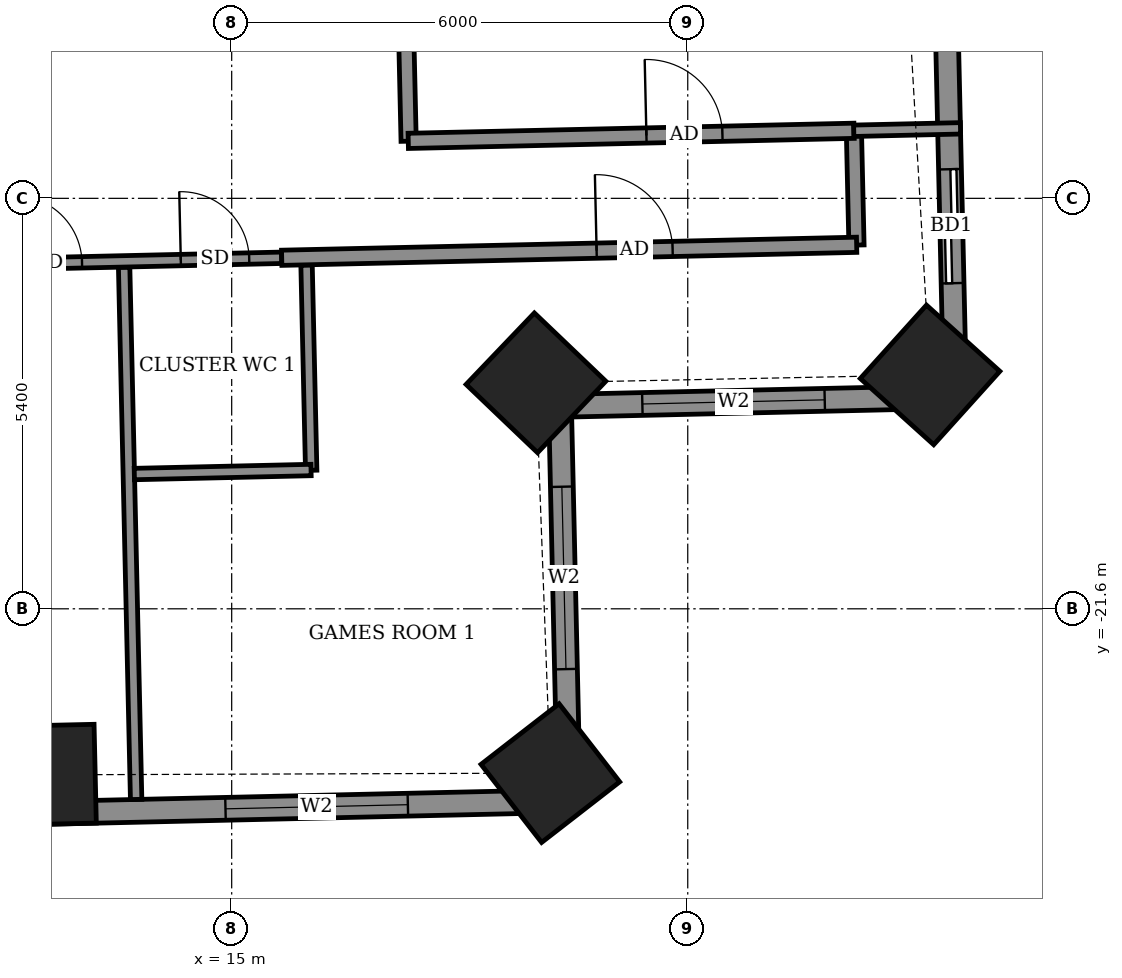
"""IFC4 building model, lengths in metres.
Left out: names, types, materials, properties, quantities, classifications, styles, units other than length and angle.
Written with IfcOpenShell. Run it as: python <this file> out.ifc"""

import sys

from ifc_helpers import new_model, si_unit, direction, frame, frame_2d, origin, origin_2d, place, context, subcontext, project, spatial, rectangle, extrude, element, fill, save


model = new_model("IFC4")
c1 = context("Model", 3, precision=1e-05, world=origin(), true_north=direction((0.0, 1.0)))
c2 = subcontext(c1, "Body", "Model", "MODEL_VIEW")
j1 = project(units=[si_unit("LENGTHUNIT", "METRE"), si_unit("PLANEANGLEUNIT", "RADIAN")], contexts=[c1])
p1 = place(None, origin())
s1 = spatial("IfcSite", under=j1, at=p1, CompositionType="ELEMENT")
p2 = place(p1, origin())
s2 = spatial("IfcBuilding", under=s1, at=p2, CompositionType="ELEMENT")
p3 = place(p2, frame((0.0, 0.0, 144.5)))
s3 = spatial("IfcBuildingStorey", under=s2, at=p3, CompositionType="ELEMENT", Elevation=144.5)
for number, where, z_axis, x_axis in (
    (1, (12.554, -23.784, -0.55), (0.0, 0.0, 1.0), (1.0, 0.023, 0.0)),
    (2, (19.192, -23.761, -0.55), (0.0, 0.0, 1.0), (0.79, 0.613, 0.0)),
    (3, (19.003, -18.627, -0.55), (0.0, 0.0, 1.0), (0.691, 0.723, 0.0)),
    (4, (24.188, -18.523, -0.55), (0.0, 0.0, 1.0), (0.67, 0.743, 0.0)),
):
    element("IfcColumn", number, at=place(p3, frame(where, z_axis=z_axis, x_axis=x_axis)), inside=s3, PredefinedType="COLUMN", context=c2, shape_type="SweptSolid", body=[
        extrude(rectangle(XDim=1.3, YDim=1.3, at=origin_2d()), origin(), (0.0, 0.0, 1.0), 3.6),
    ])
p4 = place(p3, frame((24.518, -18.812, 0.0), z_axis=(0.0, 0.0, 1.0), x_axis=(-0.02269451316, 0.999742446369, 0.0)))
e5 = element("IfcWall", 5, at=p4, inside=s3, PredefinedType="SOLIDWALL", context=c2, shape_type="SweptSolid", body=[
    extrude(rectangle(XDim=10.93, YDim=0.3, at=frame_2d((5.465, 0.0))), origin(), (0.0, 0.0, 1.0), 3.05),
])
p5 = place(p4, frame((1.496, 0.0, 0.0)))
e6 = element("IfcOpeningElement", 6, at=p5, cuts=e5, PredefinedType="OPENING", context=c2, shape_type="SweptSolid", body=[
    extrude(rectangle(XDim=1.5, YDim=2.4, at=frame_2d((0.75, 1.2))), frame((0.0, 0.16, 0.0), z_axis=(0.0, -1.0, 0.0), x_axis=(1.0, 0.0, 0.0)), (0.0, 0.0, 1.0), 0.32),
])
p6 = place(p4, frame((6.119, 0.0, 0.9)))
e7 = element("IfcOpeningElement", 7, at=p6, cuts=e5, PredefinedType="OPENING", context=c2, shape_type="SweptSolid", body=[
    extrude(rectangle(XDim=0.9, YDim=1.5, at=frame_2d((0.45, 0.75))), frame((0.0, 0.16, 0.0), z_axis=(0.0, -1.0, 0.0), x_axis=(1.0, 0.0, 0.0)), (0.0, 0.0, 1.0), 0.32),
])
p7 = place(p4, frame((7.675, 0.0, 0.9)))
e8 = element("IfcOpeningElement", 8, at=p7, cuts=e5, PredefinedType="OPENING", context=c2, shape_type="SweptSolid", body=[
    extrude(rectangle(XDim=2.4, YDim=1.5, at=frame_2d((1.2, 0.75))), frame((0.0, 0.16, 0.0), z_axis=(0.0, -1.0, 0.0), x_axis=(1.0, 0.0, 0.0)), (0.0, 0.0, 1.0), 0.32),
])
p8 = place(p3, frame((-22.396, -25.078, 0.0), z_axis=(0.0, 0.0, 1.0), x_axis=(0.99974279854, 0.022678993965, 0.0)))
e9 = element("IfcWall", 9, at=p8, inside=s3, PredefinedType="SOLIDWALL", context=c2, shape_type="SweptSolid", body=[
    extrude(rectangle(XDim=41.844, YDim=0.3, at=frame_2d((20.922, 0.0))), origin(), (0.0, 0.0, 1.0), 3.05),
])
p9 = place(p8, frame((2.196, 0.0, 0.0)))
e10 = element("IfcOpeningElement", 10, at=p9, cuts=e9, PredefinedType="OPENING", context=c2, shape_type="SweptSolid", body=[
    extrude(rectangle(XDim=1.5, YDim=2.4, at=frame_2d((0.75, 1.2))), frame((0.0, 0.16, 0.0), z_axis=(0.0, -1.0, 0.0), x_axis=(1.0, 0.0, 0.0)), (0.0, 0.0, 1.0), 0.32),
])
p10 = place(p8, frame((7.737, 0.0, 0.0)))
e11 = element("IfcOpeningElement", 11, at=p10, cuts=e9, PredefinedType="OPENING", context=c2, shape_type="SweptSolid", body=[
    extrude(rectangle(XDim=1.2, YDim=2.4, at=frame_2d((0.6, 1.2))), frame((0.0, 0.16, 0.0), z_axis=(0.0, -1.0, 0.0), x_axis=(1.0, 0.0, 0.0)), (0.0, 0.0, 1.0), 0.32),
])
p11 = place(p8, frame((10.699, 0.0, 0.0)))
e12 = element("IfcOpeningElement", 12, at=p11, cuts=e9, PredefinedType="OPENING", context=c2, shape_type="SweptSolid", body=[
    extrude(rectangle(XDim=1.5, YDim=2.4, at=frame_2d((0.75, 1.2))), frame((0.0, 0.16, 0.0), z_axis=(0.0, -1.0, 0.0), x_axis=(1.0, 0.0, 0.0)), (0.0, 0.0, 1.0), 0.32),
])
p12 = place(p8, frame((15.549, 0.0, 0.0)))
e13 = element("IfcOpeningElement", 13, at=p12, cuts=e9, PredefinedType="OPENING", context=c2, shape_type="SweptSolid", body=[
    extrude(rectangle(XDim=1.5, YDim=2.4, at=frame_2d((0.75, 1.2))), frame((0.0, 0.16, 0.0), z_axis=(0.0, -1.0, 0.0), x_axis=(1.0, 0.0, 0.0)), (0.0, 0.0, 1.0), 0.32),
])
p13 = place(p8, frame((18.661, 0.0, 0.0)))
e14 = element("IfcOpeningElement", 14, at=p13, cuts=e9, PredefinedType="OPENING", context=c2, shape_type="SweptSolid", body=[
    extrude(rectangle(XDim=1.5, YDim=2.4, at=frame_2d((0.75, 1.2))), frame((0.0, 0.16, 0.0), z_axis=(0.0, -1.0, 0.0), x_axis=(1.0, 0.0, 0.0)), (0.0, 0.0, 1.0), 0.32),
])
p14 = place(p8, frame((24.125, 0.0, 0.0)))
e15 = element("IfcOpeningElement", 15, at=p14, cuts=e9, PredefinedType="OPENING", context=c2, shape_type="SweptSolid", body=[
    extrude(rectangle(XDim=1.5, YDim=2.4, at=frame_2d((0.75, 1.2))), frame((0.0, 0.16, 0.0), z_axis=(0.0, -1.0, 0.0), x_axis=(1.0, 0.0, 0.0)), (0.0, 0.0, 1.0), 0.32),
])
p15 = place(p8, frame((29.298, 0.0, 0.0)))
e16 = element("IfcOpeningElement", 16, at=p15, cuts=e9, PredefinedType="OPENING", context=c2, shape_type="SweptSolid", body=[
    extrude(rectangle(XDim=1.5, YDim=2.4, at=frame_2d((0.75, 1.2))), frame((0.0, 0.16, 0.0), z_axis=(0.0, -1.0, 0.0), x_axis=(1.0, 0.0, 0.0)), (0.0, 0.0, 1.0), 0.32),
])
p16 = place(p8, frame((32.41, 0.0, 0.0)))
e17 = element("IfcOpeningElement", 17, at=p16, cuts=e9, PredefinedType="OPENING", context=c2, shape_type="SweptSolid", body=[
    extrude(rectangle(XDim=1.5, YDim=2.4, at=frame_2d((0.75, 1.2))), frame((0.0, 0.16, 0.0), z_axis=(0.0, -1.0, 0.0), x_axis=(1.0, 0.0, 0.0)), (0.0, 0.0, 1.0), 0.32),
])
p17 = place(p8, frame((37.324, 0.0, 0.9)))
e18 = element("IfcOpeningElement", 18, at=p17, cuts=e9, PredefinedType="OPENING", context=c2, shape_type="SweptSolid", body=[
    extrude(rectangle(XDim=2.4, YDim=1.5, at=frame_2d((1.2, 0.75))), frame((0.0, 0.16, 0.0), z_axis=(0.0, -1.0, 0.0), x_axis=(1.0, 0.0, 0.0)), (0.0, 0.0, 1.0), 0.32),
])
p18 = place(p3, frame((19.437, -24.129, 0.0), z_axis=(0.0, 0.0, 1.0), x_axis=(-0.022565008749, 0.999745377774, 0.0)))
e19 = element("IfcWall", 19, at=p18, inside=s3, PredefinedType="SOLIDWALL", context=c2, shape_type="SweptSolid", body=[
    extrude(rectangle(XDim=5.496, YDim=0.3, at=frame_2d((2.748, 0.0))), origin(), (0.0, 0.0, 1.0), 2.55),
])
p19 = place(p18, frame((1.736, 0.0, 0.9)))
e20 = element("IfcOpeningElement", 20, at=p19, cuts=e19, PredefinedType="OPENING", context=c2, shape_type="SweptSolid", body=[
    extrude(rectangle(XDim=2.4, YDim=1.5, at=frame_2d((1.2, 0.75))), frame((0.0, 0.16, 0.0), z_axis=(0.0, -1.0, 0.0), x_axis=(1.0, 0.0, 0.0)), (0.0, 0.0, 1.0), 0.32),
])
p20 = place(p3, frame((19.319, -18.93, 0.0), z_axis=(0.0, 0.0, 1.0), x_axis=(0.999742379723, 0.022697448881, 0.0)))
e21 = element("IfcWall", 21, at=p20, inside=s3, PredefinedType="SOLIDWALL", context=c2, shape_type="SweptSolid", body=[
    extrude(rectangle(XDim=5.324, YDim=0.3, at=frame_2d((2.662, 0.0))), origin(), (0.0, 0.0, 1.0), 2.55),
])
p21 = place(p20, frame((1.084, 0.0, 0.9)))
e22 = element("IfcOpeningElement", 22, at=p21, cuts=e21, PredefinedType="OPENING", context=c2, shape_type="SweptSolid", body=[
    extrude(rectangle(XDim=2.4, YDim=1.5, at=frame_2d((1.2, 0.75))), frame((0.0, 0.16, 0.0), z_axis=(0.0, -1.0, 0.0), x_axis=(1.0, 0.0, 0.0)), (0.0, 0.0, 1.0), 0.32),
])
p22 = place(p3, frame((13.743, -24.108, 0.0), z_axis=(0.0, 0.0, 1.0), x_axis=(-0.02255982614, 0.999745494736, 0.0)))
e23 = element("IfcWall", 23, at=p22, inside=s3, PredefinedType="PARTITIONING", context=c2, shape_type="SweptSolid", body=[
    extrude(rectangle(XDim=7.002, YDim=0.15, at=frame_2d((3.501, 0.0))), origin(), (0.0, 0.0, 1.0), 2.55),
])
p23 = place(p3, frame((16.046, -19.778, 0.0), z_axis=(0.0, 0.0, 1.0), x_axis=(-0.022518033722, 0.999746436932, 0.0)))
e24 = element("IfcWall", 24, at=p23, inside=s3, PredefinedType="PARTITIONING", context=c2, shape_type="SweptSolid", body=[
    extrude(rectangle(XDim=2.7, YDim=0.15, at=frame_2d((1.35, 0.0))), origin(), (0.0, 0.0, 1.0), 3.05),
])
p24 = place(p3, frame((13.719, -19.827, 0.0), z_axis=(0.0, 0.0, 1.0), x_axis=(0.999740478815, 0.022781023197, 0.0)))
e25 = element("IfcWall", 25, at=p24, inside=s3, PredefinedType="PARTITIONING", context=c2, shape_type="SweptSolid", body=[
    extrude(rectangle(XDim=2.325, YDim=0.15, at=frame_2d((1.163, 0.0))), origin(), (0.0, 0.0, 1.0), 3.05),
])
p25 = place(p3, frame((23.22, -16.815, 0.0), z_axis=(0.0, 0.0, 1.0), x_axis=(-0.022617910375, 0.999744182344, 0.0)))
e26 = element("IfcWall", 26, at=p25, inside=s3, PredefinedType="PARTITIONING", context=c2, shape_type="SweptSolid", body=[
    extrude(rectangle(XDim=1.5, YDim=0.2, at=frame_2d((0.75, 0.0))), origin(), (0.0, 0.0, 1.0), 3.05),
])
p26 = place(p3, frame((-14.871, -17.675, 0.0), z_axis=(0.0, 0.0, 1.0), x_axis=(0.999742359486, 0.02269834024, 0.0)))
e27 = element("IfcWall", 27, at=p26, inside=s3, PredefinedType="PARTITIONING", context=c2, shape_type="SweptSolid", body=[
    extrude(rectangle(XDim=30.536, YDim=0.15, at=frame_2d((15.268, 0.0))), origin(), (0.0, 0.0, 1.0), 3.05),
])
p27 = place(p26, frame((0.284, 0.0, 0.0)))
e28 = element("IfcOpeningElement", 28, at=p27, cuts=e27, PredefinedType="OPENING", context=c2, shape_type="SweptSolid", body=[
    extrude(rectangle(XDim=0.9, YDim=2.1, at=frame_2d((0.45, 1.05))), frame((0.0, 0.085, 0.0), z_axis=(0.0, -1.0, 0.0), x_axis=(1.0, 0.0, 0.0)), (0.0, 0.0, 1.0), 0.17),
])
p28 = place(p26, frame((2.259, 0.0, 0.0)))
e29 = element("IfcOpeningElement", 29, at=p28, cuts=e27, PredefinedType="OPENING", context=c2, shape_type="SweptSolid", body=[
    extrude(rectangle(XDim=0.9, YDim=2.1, at=frame_2d((0.45, 1.05))), frame((0.0, 0.085, 0.0), z_axis=(0.0, -1.0, 0.0), x_axis=(1.0, 0.0, 0.0)), (0.0, 0.0, 1.0), 0.17),
])
p29 = place(p26, frame((9.109, 0.0, 0.0)))
e30 = element("IfcOpeningElement", 30, at=p29, cuts=e27, PredefinedType="OPENING", context=c2, shape_type="SweptSolid", body=[
    extrude(rectangle(XDim=0.9, YDim=2.1, at=frame_2d((0.45, 1.05))), frame((0.0, 0.085, 0.0), z_axis=(0.0, -1.0, 0.0), x_axis=(1.0, 0.0, 0.0)), (0.0, 0.0, 1.0), 0.17),
])
p30 = place(p26, frame((11.109, 0.0, 0.0)))
e31 = element("IfcOpeningElement", 31, at=p30, cuts=e27, PredefinedType="OPENING", context=c2, shape_type="SweptSolid", body=[
    extrude(rectangle(XDim=0.9, YDim=2.1, at=frame_2d((0.45, 1.05))), frame((0.0, 0.085, 0.0), z_axis=(0.0, -1.0, 0.0), x_axis=(1.0, 0.0, 0.0)), (0.0, 0.0, 1.0), 0.17),
])
p31 = place(p26, frame((17.934, 0.0, 0.0)))
e32 = element("IfcOpeningElement", 32, at=p31, cuts=e27, PredefinedType="OPENING", context=c2, shape_type="SweptSolid", body=[
    extrude(rectangle(XDim=0.9, YDim=2.1, at=frame_2d((0.45, 1.05))), frame((0.0, 0.085, 0.0), z_axis=(0.0, -1.0, 0.0), x_axis=(1.0, 0.0, 0.0)), (0.0, 0.0, 1.0), 0.17),
])
p32 = place(p26, frame((20.109, 0.0, 0.0)))
e33 = element("IfcOpeningElement", 33, at=p32, cuts=e27, PredefinedType="OPENING", context=c2, shape_type="SweptSolid", body=[
    extrude(rectangle(XDim=0.9, YDim=2.1, at=frame_2d((0.45, 1.05))), frame((0.0, 0.085, 0.0), z_axis=(0.0, -1.0, 0.0), x_axis=(1.0, 0.0, 0.0)), (0.0, 0.0, 1.0), 0.17),
])
p33 = place(p26, frame((27.009, 0.0, 0.0)))
e34 = element("IfcOpeningElement", 34, at=p33, cuts=e27, PredefinedType="OPENING", context=c2, shape_type="SweptSolid", body=[
    extrude(rectangle(XDim=0.9, YDim=2.1, at=frame_2d((0.45, 1.05))), frame((0.0, 0.085, 0.0), z_axis=(0.0, -1.0, 0.0), x_axis=(1.0, 0.0, 0.0)), (0.0, 0.0, 1.0), 0.17),
])
p34 = place(p26, frame((29.209, 0.0, 0.0)))
e35 = element("IfcOpeningElement", 35, at=p34, cuts=e27, PredefinedType="OPENING", context=c2, shape_type="SweptSolid", body=[
    extrude(rectangle(XDim=0.9, YDim=2.1, at=frame_2d((0.45, 1.05))), frame((0.0, 0.085, 0.0), z_axis=(0.0, -1.0, 0.0), x_axis=(1.0, 0.0, 0.0)), (0.0, 0.0, 1.0), 0.17),
])
p35 = place(p3, frame((15.658, -16.982, 0.0), z_axis=(0.0, 0.0, 1.0), x_axis=(0.99974485859, 0.022587999516, 0.0)))
e36 = element("IfcWall", 36, at=p35, inside=s3, PredefinedType="PARTITIONING", context=c2, shape_type="SweptSolid", body=[
    extrude(rectangle(XDim=7.566, YDim=0.2, at=frame_2d((3.783, 0.0))), origin(), (0.0, 0.0, 1.0), 3.05),
])
p36 = place(p35, frame((4.144, 0.0, 0.0)))
e37 = element("IfcOpeningElement", 37, at=p36, cuts=e36, PredefinedType="OPENING", context=c2, shape_type="SweptSolid", body=[
    extrude(rectangle(XDim=1.0, YDim=2.1, at=frame_2d((0.5, 1.05))), frame((0.0, 0.11, 0.0), z_axis=(0.0, -1.0, 0.0), x_axis=(1.0, 0.0, 0.0)), (0.0, 0.0, 1.0), 0.22),
])
p37 = place(p3, frame((17.328, -15.448, 0.0), z_axis=(0.0, 0.0, 1.0), x_axis=(-0.022680883318, 0.999742755679, 0.0)))
e38 = element("IfcWall", 38, at=p37, inside=s3, PredefinedType="PARTITIONING", context=c2, shape_type="SweptSolid", body=[
    extrude(rectangle(XDim=7.664, YDim=0.2, at=frame_2d((3.832, 0.0))), origin(), (0.0, 0.0, 1.0), 3.05),
])
p38 = place(p37, frame((5.13, 0.0, 0.0)))
e39 = element("IfcOpeningElement", 39, at=p38, cuts=e38, PredefinedType="OPENING", context=c2, shape_type="SweptSolid", body=[
    extrude(rectangle(XDim=1.0, YDim=2.1, at=frame_2d((0.5, 1.05))), frame((0.0, 0.11, 0.0), z_axis=(0.0, -1.0, 0.0), x_axis=(1.0, 0.0, 0.0)), (0.0, 0.0, 1.0), 0.22),
])
p39 = place(p3, frame((17.323, -15.444, 0.0), z_axis=(0.0, 0.0, 1.0), x_axis=(0.999742758565, 0.022680756085, 0.0)))
e40 = element("IfcWall", 40, at=p39, inside=s3, PredefinedType="PARTITIONING", context=c2, shape_type="SweptSolid", body=[
    extrude(rectangle(XDim=5.866, YDim=0.2, at=frame_2d((2.933, 0.0))), origin(), (0.0, 0.0, 1.0), 3.05),
])
p40 = place(p39, frame((3.134, 0.0, 0.0)))
e41 = element("IfcOpeningElement", 41, at=p40, cuts=e40, PredefinedType="OPENING", context=c2, shape_type="SweptSolid", body=[
    extrude(rectangle(XDim=1.0, YDim=2.1, at=frame_2d((0.5, 1.05))), frame((0.0, 0.11, 0.0), z_axis=(0.0, -1.0, 0.0), x_axis=(1.0, 0.0, 0.0)), (0.0, 0.0, 1.0), 0.22),
])
p41 = place(p3, frame((23.184, -15.311, 0.0), z_axis=(0.0, 0.0, 1.0), x_axis=(0.999740577356, 0.022776698371, 0.0)))
e42 = element("IfcWall", 42, at=p41, inside=s3, PredefinedType="PARTITIONING", context=c2, shape_type="SweptSolid", body=[
    extrude(rectangle(XDim=1.404, YDim=0.15, at=frame_2d((0.702, 0.0))), origin(), (0.0, 0.0, 1.0), 2.55),
])
p42 = place(p5, origin())
e43 = element("IfcDoor", 43, at=p42, inside=s3, OperationType="SLIDING_TO_LEFT", PredefinedType="DOOR", context=c2, shape_type="SweptSolid", body=[
    extrude(rectangle(XDim=1.5, YDim=2.4, at=frame_2d((0.75, 1.2))), frame((0.0, 0.025, 0.0), z_axis=(0.0, -1.0, 0.0), x_axis=(1.0, 0.0, 0.0)), (0.0, 0.0, 1.0), 0.05),
])
fill(e6, e43)
p43 = place(p17, origin())
e44 = element("IfcWindow", 44, at=p43, inside=s3, PartitioningType="DOUBLE_PANEL_VERTICAL", PredefinedType="WINDOW", context=c2, shape_type="SweptSolid", body=[
    extrude(rectangle(XDim=2.4, YDim=1.5, at=frame_2d((1.2, 0.75))), frame((0.0, 0.03, 0.0), z_axis=(0.0, -1.0, 0.0), x_axis=(1.0, 0.0, 0.0)), (0.0, 0.0, 1.0), 0.06),
])
fill(e18, e44)
p44 = place(p19, origin())
e45 = element("IfcWindow", 45, at=p44, inside=s3, PartitioningType="DOUBLE_PANEL_VERTICAL", PredefinedType="WINDOW", context=c2, shape_type="SweptSolid", body=[
    extrude(rectangle(XDim=2.4, YDim=1.5, at=frame_2d((1.2, 0.75))), frame((0.0, 0.03, 0.0), z_axis=(0.0, -1.0, 0.0), x_axis=(1.0, 0.0, 0.0)), (0.0, 0.0, 1.0), 0.06),
])
fill(e20, e45)
p45 = place(p21, origin())
e46 = element("IfcWindow", 46, at=p45, inside=s3, PartitioningType="DOUBLE_PANEL_VERTICAL", PredefinedType="WINDOW", context=c2, shape_type="SweptSolid", body=[
    extrude(rectangle(XDim=2.4, YDim=1.5, at=frame_2d((1.2, 0.75))), frame((0.0, 0.03, 0.0), z_axis=(0.0, -1.0, 0.0), x_axis=(1.0, 0.0, 0.0)), (0.0, 0.0, 1.0), 0.06),
])
fill(e22, e46)
p46 = place(p33, origin())
e47 = element("IfcDoor", 47, at=p46, inside=s3, OperationType="SINGLE_SWING_LEFT", PredefinedType="DOOR", context=c2, shape_type="SweptSolid", body=[
    extrude(rectangle(XDim=0.9, YDim=2.1, at=frame_2d((0.45, 1.05))), frame((0.0, 0.025, 0.0), z_axis=(0.0, -1.0, 0.0), x_axis=(1.0, 0.0, 0.0)), (0.0, 0.0, 1.0), 0.05),
])
fill(e34, e47)
p47 = place(p36, origin())
e48 = element("IfcDoor", 48, at=p47, inside=s3, OperationType="SINGLE_SWING_RIGHT", PredefinedType="DOOR", context=c2, shape_type="SweptSolid", body=[
    extrude(rectangle(XDim=1.0, YDim=2.1, at=frame_2d((0.5, 1.05))), frame((0.0, 0.025, 0.0), z_axis=(0.0, -1.0, 0.0), x_axis=(1.0, 0.0, 0.0)), (0.0, 0.0, 1.0), 0.05),
])
fill(e37, e48)
p48 = place(p34, origin())
e49 = element("IfcDoor", 49, at=p48, inside=s3, OperationType="SINGLE_SWING_RIGHT", PredefinedType="DOOR", context=c2, shape_type="SweptSolid", body=[
    extrude(rectangle(XDim=0.9, YDim=2.1, at=frame_2d((0.45, 1.05))), frame((0.0, 0.025, 0.0), z_axis=(0.0, -1.0, 0.0), x_axis=(1.0, 0.0, 0.0)), (0.0, 0.0, 1.0), 0.05),
])
fill(e35, e49)
p49 = place(p40, origin())
e50 = element("IfcDoor", 50, at=p49, inside=s3, OperationType="SINGLE_SWING_LEFT", PredefinedType="DOOR", context=c2, shape_type="SweptSolid", body=[
    extrude(rectangle(XDim=1.0, YDim=2.1, at=frame_2d((0.5, 1.05))), frame((0.0, 0.025, 0.0), z_axis=(0.0, -1.0, 0.0), x_axis=(1.0, 0.0, 0.0)), (0.0, 0.0, 1.0), 0.05),
])
fill(e41, e50)
save(model, sys.argv[1])
